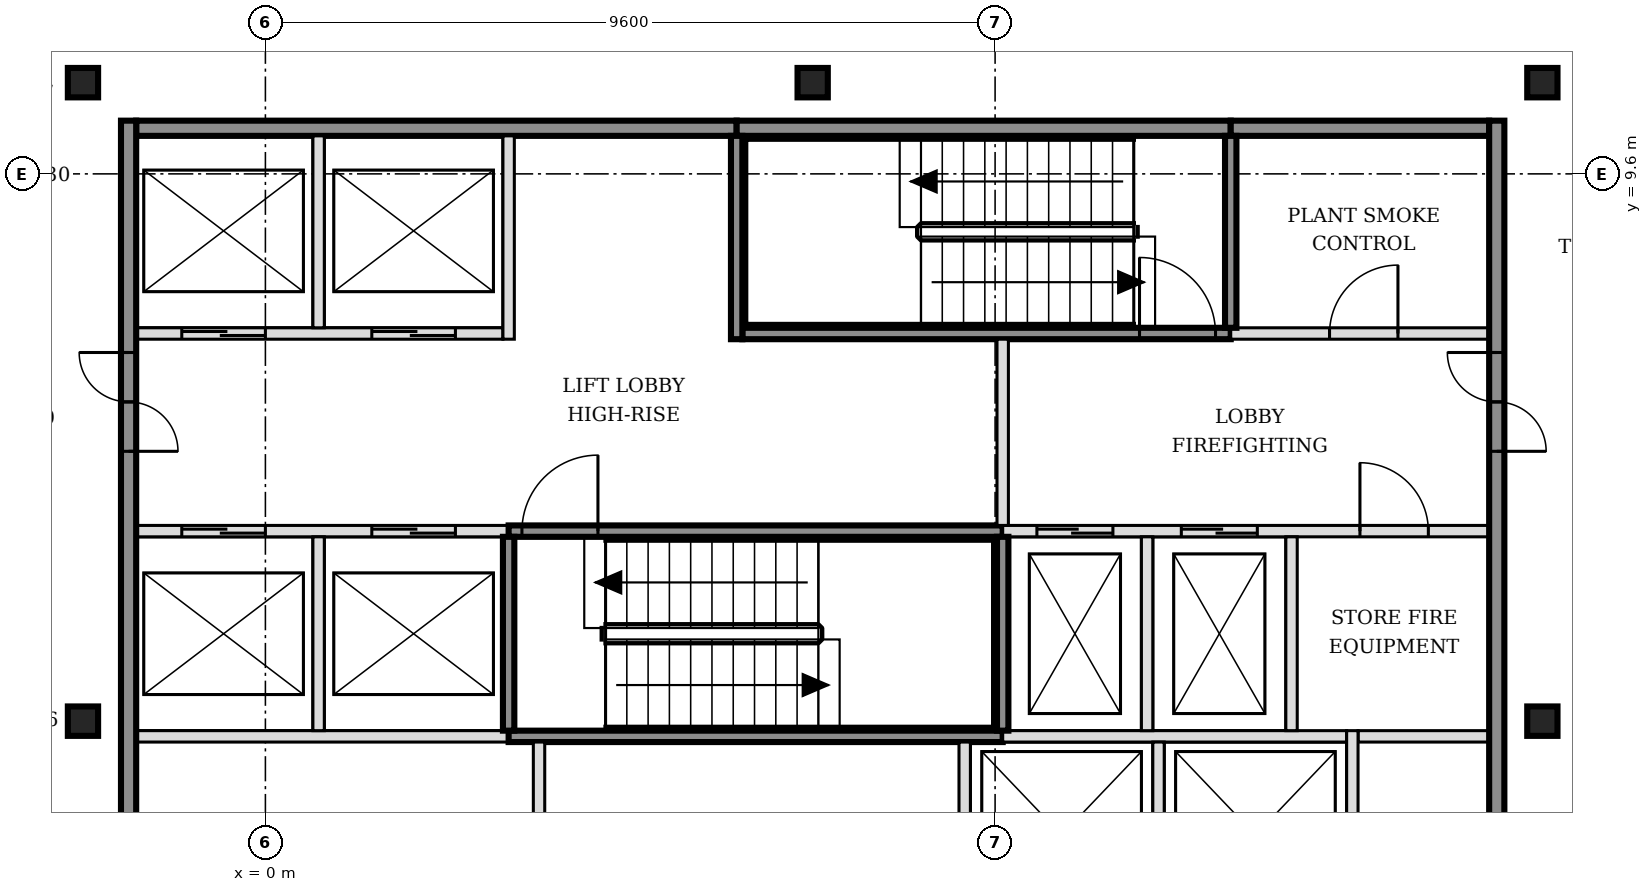
"""IFC4 building model, lengths in metres.
Left out: names, types, materials, properties, quantities, classifications, styles, units other than length and angle.
Written with IfcOpenShell. Run it as: python <this file> out.ifc"""

import sys

from ifc_helpers import new_model, si_unit, direction, frame, frame_2d, origin, origin_2d, place, context, subcontext, project, spatial, rectangle, i_section, extrude, element, fill, save


model = new_model("IFC4")
c1 = context("Model", 3, precision=1e-05, world=origin(), true_north=direction((0.0, 1.0)))
c2 = subcontext(c1, "Body", "Model", "MODEL_VIEW")
j1 = project(units=[si_unit("LENGTHUNIT", "METRE"), si_unit("PLANEANGLEUNIT", "RADIAN")], contexts=[c1])
p1 = place(None, origin())
s1 = spatial("IfcSite", under=j1, at=p1, CompositionType="ELEMENT")
p2 = place(p1, origin())
s2 = spatial("IfcBuilding", under=s1, at=p2, CompositionType="ELEMENT")
p3 = place(p2, frame((0.0, 0.0, 285.0)))
s3 = spatial("IfcBuildingStorey", under=s2, at=p3, CompositionType="ELEMENT", Elevation=285.0)
for number, where, z_axis, x_axis in (
    (1, (-2.4, 2.4, -0.15), (0.0, 0.0, 1.0), (1.0, 0.0, 0.0)),
    (2, (16.8, 2.4, -0.15), (0.0, 0.0, 1.0), (1.0, 0.0, 0.0)),
    (3, (-2.4, 10.8, -0.15), (0.0, 0.0, 1.0), (1.0, 0.0, 0.0)),
    (4, (7.2, 10.8, -0.15), (0.0, 0.0, 1.0), (1.0, 0.0, 0.0)),
    (5, (16.8, 10.8, -0.15), (0.0, 0.0, 1.0), (1.0, 0.0, 0.0)),
):
    element("IfcColumn", number, at=place(p3, frame(where, z_axis=z_axis, x_axis=x_axis)), inside=s3, PredefinedType="COLUMN", context=c2, shape_type="SweptSolid", body=[
        extrude(i_section(OverallWidth=0.398, OverallDepth=0.387, WebThickness=0.021, FlangeThickness=0.033, FilletRadius=0.015, at=origin_2d()), origin(), (0.0, 0.0, 1.0), 3.6),
    ])
p4 = place(p3, frame((-1.7, 2.2, 0.0), z_axis=(0.0, 0.0, 1.0), x_axis=(1.0, 0.0, 0.0)))
e6 = element("IfcWall", 6, at=p4, inside=s3, PredefinedType="SOLIDWALL", context=c2, shape_type="SweptSolid", body=[
    extrude(rectangle(XDim=4.9, YDim=0.15, at=frame_2d((2.45, 0.0))), origin(), (0.0, 0.0, 1.0), 3.45),
])
p5 = place(p3, frame((3.2, 2.2, 0.0), z_axis=(0.0, 0.0, 1.0), x_axis=(1.0, 0.0, 0.0)))
e7 = element("IfcWall", 7, at=p5, inside=s3, PredefinedType="SOLIDWALL", context=c2, shape_type="SweptSolid", body=[
    extrude(rectangle(XDim=6.5, YDim=0.15, at=frame_2d((3.25, 0.0))), origin(), (0.0, 0.0, 1.0), 3.45),
])
p6 = place(p3, frame((9.7, 2.2, 0.0), z_axis=(0.0, 0.0, 1.0), x_axis=(1.0, 0.0, 0.0)))
e8 = element("IfcWall", 8, at=p6, inside=s3, PredefinedType="SOLIDWALL", context=c2, shape_type="SweptSolid", body=[
    extrude(rectangle(XDim=4.525, YDim=0.15, at=frame_2d((2.263, 0.0))), origin(), (0.0, 0.0, 1.0), 3.45),
])
p7 = place(p3, frame((14.375, 2.2, 0.0), z_axis=(0.0, 0.0, 1.0), x_axis=(1.0, 0.0, 0.0)))
e9 = element("IfcWall", 9, at=p7, inside=s3, PredefinedType="PARTITIONING", context=c2, shape_type="SweptSolid", body=[
    extrude(rectangle(XDim=1.725, YDim=0.15, at=frame_2d((0.863, 0.0))), origin(), (0.0, 0.0, 1.0), 3.45),
])
p8 = place(p3, frame((-1.7, 4.9, 0.0), z_axis=(0.0, 0.0, 1.0), x_axis=(1.0, 0.0, 0.0)))
e10 = element("IfcWall", 10, at=p8, inside=s3, PredefinedType="SOLIDWALL", context=c2, shape_type="SweptSolid", body=[
    extrude(rectangle(XDim=4.9, YDim=0.15, at=frame_2d((2.45, 0.0))), origin(), (0.0, 0.0, 1.0), 3.45),
])
p9 = place(p8, frame((0.6, 0.0, 0.0)))
e11 = element("IfcOpeningElement", 11, at=p9, cuts=e10, PredefinedType="OPENING", context=c2, shape_type="SweptSolid", body=[
    extrude(rectangle(XDim=1.1, YDim=2.1, at=frame_2d((0.55, 1.05))), frame((0.0, 0.085, 0.0), z_axis=(0.0, -1.0, 0.0), x_axis=(1.0, 0.0, 0.0)), (0.0, 0.0, 1.0), 0.17),
])
p10 = place(p8, frame((3.1, 0.0, 0.0)))
e12 = element("IfcOpeningElement", 12, at=p10, cuts=e10, PredefinedType="OPENING", context=c2, shape_type="SweptSolid", body=[
    extrude(rectangle(XDim=1.1, YDim=2.1, at=frame_2d((0.55, 1.05))), frame((0.0, 0.085, 0.0), z_axis=(0.0, -1.0, 0.0), x_axis=(1.0, 0.0, 0.0)), (0.0, 0.0, 1.0), 0.17),
])
p11 = place(p3, frame((3.2, 4.9, 0.0), z_axis=(0.0, 0.0, 1.0), x_axis=(1.0, 0.0, 0.0)))
e13 = element("IfcWall", 13, at=p11, inside=s3, PredefinedType="SOLIDWALL", context=c2, shape_type="SweptSolid", body=[
    extrude(rectangle(XDim=6.5, YDim=0.15, at=frame_2d((3.25, 0.0))), origin(), (0.0, 0.0, 1.0), 3.45),
])
p12 = place(p11, frame((0.175, 0.0, 0.0)))
e14 = element("IfcOpeningElement", 14, at=p12, cuts=e13, PredefinedType="OPENING", context=c2, shape_type="SweptSolid", body=[
    extrude(rectangle(XDim=1.0, YDim=2.1, at=frame_2d((0.5, 1.05))), frame((0.0, 0.085, 0.0), z_axis=(0.0, -1.0, 0.0), x_axis=(1.0, 0.0, 0.0)), (0.0, 0.0, 1.0), 0.17),
])
p13 = place(p3, frame((9.7, 4.9, 0.0), z_axis=(0.0, 0.0, 1.0), x_axis=(1.0, 0.0, 0.0)))
e15 = element("IfcWall", 15, at=p13, inside=s3, PredefinedType="SOLIDWALL", context=c2, shape_type="SweptSolid", body=[
    extrude(rectangle(XDim=6.4, YDim=0.15, at=frame_2d((3.2, 0.0))), origin(), (0.0, 0.0, 1.0), 3.45),
])
p14 = place(p13, frame((0.45, 0.0, 0.0)))
e16 = element("IfcOpeningElement", 16, at=p14, cuts=e15, PredefinedType="OPENING", context=c2, shape_type="SweptSolid", body=[
    extrude(rectangle(XDim=1.0, YDim=2.1, at=frame_2d((0.5, 1.05))), frame((0.0, 0.085, 0.0), z_axis=(0.0, -1.0, 0.0), x_axis=(1.0, 0.0, 0.0)), (0.0, 0.0, 1.0), 0.17),
])
p15 = place(p13, frame((2.35, 0.0, 0.0)))
e17 = element("IfcOpeningElement", 17, at=p15, cuts=e15, PredefinedType="OPENING", context=c2, shape_type="SweptSolid", body=[
    extrude(rectangle(XDim=1.0, YDim=2.1, at=frame_2d((0.5, 1.05))), frame((0.0, 0.085, 0.0), z_axis=(0.0, -1.0, 0.0), x_axis=(1.0, 0.0, 0.0)), (0.0, 0.0, 1.0), 0.17),
])
p16 = place(p13, frame((4.7, 0.0, 0.0)))
e18 = element("IfcOpeningElement", 18, at=p16, cuts=e15, PredefinedType="OPENING", context=c2, shape_type="SweptSolid", body=[
    extrude(rectangle(XDim=0.9, YDim=2.1, at=frame_2d((0.45, 1.05))), frame((0.0, 0.085, 0.0), z_axis=(0.0, -1.0, 0.0), x_axis=(1.0, 0.0, 0.0)), (0.0, 0.0, 1.0), 0.17),
])
p17 = place(p3, frame((-1.7, 7.5, 0.0), z_axis=(0.0, 0.0, 1.0), x_axis=(1.0, 0.0, 0.0)))
e19 = element("IfcWall", 19, at=p17, inside=s3, PredefinedType="SOLIDWALL", context=c2, shape_type="SweptSolid", body=[
    extrude(rectangle(XDim=4.825, YDim=0.15, at=frame_2d((2.413, 0.0))), origin(), (0.0, 0.0, 1.0), 3.45),
])
p18 = place(p17, frame((0.6, 0.0, 0.0)))
e20 = element("IfcOpeningElement", 20, at=p18, cuts=e19, PredefinedType="OPENING", context=c2, shape_type="SweptSolid", body=[
    extrude(rectangle(XDim=1.1, YDim=2.1, at=frame_2d((0.55, 1.05))), frame((0.0, 0.085, 0.0), z_axis=(0.0, -1.0, 0.0), x_axis=(1.0, 0.0, 0.0)), (0.0, 0.0, 1.0), 0.17),
])
p19 = place(p17, frame((3.1, 0.0, 0.0)))
e21 = element("IfcOpeningElement", 21, at=p19, cuts=e19, PredefinedType="OPENING", context=c2, shape_type="SweptSolid", body=[
    extrude(rectangle(XDim=1.1, YDim=2.1, at=frame_2d((0.55, 1.05))), frame((0.0, 0.085, 0.0), z_axis=(0.0, -1.0, 0.0), x_axis=(1.0, 0.0, 0.0)), (0.0, 0.0, 1.0), 0.17),
])
p20 = place(p3, frame((6.275, 7.5, 0.0), z_axis=(0.0, 0.0, 1.0), x_axis=(1.0, 0.0, 0.0)))
e22 = element("IfcWall", 22, at=p20, inside=s3, PredefinedType="SOLIDWALL", context=c2, shape_type="SweptSolid", body=[
    extrude(rectangle(XDim=6.425, YDim=0.15, at=frame_2d((3.212, 0.0))), origin(), (0.0, 0.0, 1.0), 3.45),
])
p21 = place(p20, frame((5.225, 0.0, 0.0)))
e23 = element("IfcOpeningElement", 23, at=p21, cuts=e22, PredefinedType="OPENING", context=c2, shape_type="SweptSolid", body=[
    extrude(rectangle(XDim=1.0, YDim=2.1, at=frame_2d((0.5, 1.05))), frame((0.0, 0.085, 0.0), z_axis=(0.0, -1.0, 0.0), x_axis=(1.0, 0.0, 0.0)), (0.0, 0.0, 1.0), 0.17),
])
p22 = place(p3, frame((12.7, 7.5, 0.0), z_axis=(0.0, 0.0, 1.0), x_axis=(1.0, 0.0, 0.0)))
e24 = element("IfcWall", 24, at=p22, inside=s3, PredefinedType="SOLIDWALL", context=c2, shape_type="SweptSolid", body=[
    extrude(rectangle(XDim=3.4, YDim=0.15, at=frame_2d((1.7, 0.0))), origin(), (0.0, 0.0, 1.0), 3.45),
])
p23 = place(p22, frame((1.3, 0.0, 0.0)))
e25 = element("IfcOpeningElement", 25, at=p23, cuts=e24, PredefinedType="OPENING", context=c2, shape_type="SweptSolid", body=[
    extrude(rectangle(XDim=0.9, YDim=2.1, at=frame_2d((0.45, 1.05))), frame((0.0, 0.085, 0.0), z_axis=(0.0, -1.0, 0.0), x_axis=(1.0, 0.0, 0.0)), (0.0, 0.0, 1.0), 0.17),
])
p24 = place(p3, frame((-1.7, 10.2, 0.0), z_axis=(0.0, 0.0, 1.0), x_axis=(1.0, 0.0, 0.0)))
e26 = element("IfcWall", 26, at=p24, inside=s3, PredefinedType="SOLIDWALL", context=c2, shape_type="SweptSolid", body=[
    extrude(rectangle(XDim=7.9, YDim=0.2, at=frame_2d((3.95, 0.0))), origin(), (0.0, 0.0, 1.0), 3.45),
])
p25 = place(p3, frame((6.2, 10.2, 0.0), z_axis=(0.0, 0.0, 1.0), x_axis=(1.0, 0.0, 0.0)))
e27 = element("IfcWall", 27, at=p25, inside=s3, PredefinedType="SOLIDWALL", context=c2, shape_type="SweptSolid", body=[
    extrude(rectangle(XDim=6.5, YDim=0.2, at=frame_2d((3.25, 0.0))), origin(), (0.0, 0.0, 1.0), 3.45),
])
p26 = place(p3, frame((12.7, 10.2, 0.0), z_axis=(0.0, 0.0, 1.0), x_axis=(1.0, 0.0, 0.0)))
e28 = element("IfcWall", 28, at=p26, inside=s3, PredefinedType="SOLIDWALL", context=c2, shape_type="SweptSolid", body=[
    extrude(rectangle(XDim=3.4, YDim=0.2, at=frame_2d((1.7, 0.0))), origin(), (0.0, 0.0, 1.0), 3.45),
])
p27 = place(p3, frame((-1.8, -5.5, 0.0), z_axis=(0.0, 0.0, 1.0), x_axis=(0.0, 1.0, 0.0)))
e29 = element("IfcWall", 29, at=p27, inside=s3, PredefinedType="SOLIDWALL", context=c2, shape_type="SweptSolid", body=[
    extrude(rectangle(XDim=15.8, YDim=0.2, at=frame_2d((7.9, 0.0))), origin(), (0.0, 0.0, 1.0), 3.45),
])
p28 = place(p27, frame((3.05, 0.0, 0.0)))
e30 = element("IfcOpeningElement", 30, at=p28, cuts=e29, PredefinedType="OPENING", context=c2, shape_type="SweptSolid", body=[
    extrude(rectangle(XDim=1.3, YDim=2.1, at=frame_2d((0.65, 1.05))), frame((0.0, 0.11, 0.0), z_axis=(0.0, -1.0, 0.0), x_axis=(1.0, 0.0, 0.0)), (0.0, 0.0, 1.0), 0.22),
])
p29 = place(p27, frame((11.45, 0.0, 0.0)))
e31 = element("IfcOpeningElement", 31, at=p29, cuts=e29, PredefinedType="OPENING", context=c2, shape_type="SweptSolid", body=[
    extrude(rectangle(XDim=1.3, YDim=2.1, at=frame_2d((0.65, 1.05))), frame((0.0, 0.11, 0.0), z_axis=(0.0, -1.0, 0.0), x_axis=(1.0, 0.0, 0.0)), (0.0, 0.0, 1.0), 0.22),
])
p30 = place(p3, frame((0.7, 2.275, 0.0), z_axis=(0.0, 0.0, 1.0), x_axis=(0.0, 1.0, 0.0)))
e32 = element("IfcWall", 32, at=p30, inside=s3, PredefinedType="SOLIDWALL", context=c2, shape_type="SweptSolid", body=[
    extrude(rectangle(XDim=2.55, YDim=0.15, at=frame_2d((1.275, 0.0))), origin(), (0.0, 0.0, 1.0), 3.45),
])
p31 = place(p3, frame((0.7, 7.575, 0.0), z_axis=(0.0, 0.0, 1.0), x_axis=(0.0, 1.0, 0.0)))
e33 = element("IfcWall", 33, at=p31, inside=s3, PredefinedType="SOLIDWALL", context=c2, shape_type="SweptSolid", body=[
    extrude(rectangle(XDim=2.525, YDim=0.15, at=frame_2d((1.263, 0.0))), origin(), (0.0, 0.0, 1.0), 3.45),
])
p32 = place(p3, frame((3.2, 2.275, 0.0), z_axis=(0.0, 0.0, 1.0), x_axis=(0.0, 1.0, 0.0)))
e34 = element("IfcWall", 34, at=p32, inside=s3, PredefinedType="SOLIDWALL", context=c2, shape_type="SweptSolid", body=[
    extrude(rectangle(XDim=2.55, YDim=0.15, at=frame_2d((1.275, 0.0))), origin(), (0.0, 0.0, 1.0), 3.45),
])
p33 = place(p3, frame((3.2, 7.425, 0.0), z_axis=(0.0, 0.0, 1.0), x_axis=(0.0, 1.0, 0.0)))
e35 = element("IfcWall", 35, at=p33, inside=s3, PredefinedType="SOLIDWALL", context=c2, shape_type="SweptSolid", body=[
    extrude(rectangle(XDim=2.675, YDim=0.15, at=frame_2d((1.337, 0.0))), origin(), (0.0, 0.0, 1.0), 3.45),
])
p34 = place(p3, frame((3.6, -0.325, 0.0), z_axis=(0.0, 0.0, 1.0), x_axis=(0.0, 1.0, 0.0)))
e36 = element("IfcWall", 36, at=p34, inside=s3, PredefinedType="PARTITIONING", context=c2, shape_type="SweptSolid", body=[
    extrude(rectangle(XDim=2.45, YDim=0.15, at=frame_2d((1.225, 0.0))), origin(), (0.0, 0.0, 1.0), 3.45),
])
p35 = place(p3, frame((6.2, 7.425, 0.0), z_axis=(0.0, 0.0, 1.0), x_axis=(0.0, 1.0, 0.0)))
e37 = element("IfcWall", 37, at=p35, inside=s3, PredefinedType="SOLIDWALL", context=c2, shape_type="SweptSolid", body=[
    extrude(rectangle(XDim=2.675, YDim=0.15, at=frame_2d((1.337, 0.0))), origin(), (0.0, 0.0, 1.0), 3.45),
])
p36 = place(p3, frame((9.2, -0.475, 0.0), z_axis=(0.0, 0.0, 1.0), x_axis=(0.0, 1.0, 0.0)))
e38 = element("IfcWall", 38, at=p36, inside=s3, PredefinedType="SOLIDWALL", context=c2, shape_type="SweptSolid", body=[
    extrude(rectangle(XDim=2.6, YDim=0.15, at=frame_2d((1.3, 0.0))), origin(), (0.0, 0.0, 1.0), 3.45),
])
p37 = place(p3, frame((9.7, 2.275, 0.0), z_axis=(0.0, 0.0, 1.0), x_axis=(0.0, 1.0, 0.0)))
e39 = element("IfcWall", 39, at=p37, inside=s3, PredefinedType="SOLIDWALL", context=c2, shape_type="SweptSolid", body=[
    extrude(rectangle(XDim=2.55, YDim=0.15, at=frame_2d((1.275, 0.0))), origin(), (0.0, 0.0, 1.0), 3.45),
])
p38 = place(p3, frame((9.7, 4.975, 0.0), z_axis=(0.0, 0.0, 1.0), x_axis=(0.0, 1.0, 0.0)))
e40 = element("IfcWall", 40, at=p38, inside=s3, PredefinedType="SOLIDWALL", context=c2, shape_type="SweptSolid", body=[
    extrude(rectangle(XDim=2.45, YDim=0.15, at=frame_2d((1.225, 0.0))), origin(), (0.0, 0.0, 1.0), 3.45),
])
p39 = place(p3, frame((11.6, 2.275, 0.0), z_axis=(0.0, 0.0, 1.0), x_axis=(0.0, 1.0, 0.0)))
e41 = element("IfcWall", 41, at=p39, inside=s3, PredefinedType="SOLIDWALL", context=c2, shape_type="SweptSolid", body=[
    extrude(rectangle(XDim=2.55, YDim=0.15, at=frame_2d((1.275, 0.0))), origin(), (0.0, 0.0, 1.0), 3.45),
])
p40 = place(p3, frame((11.75, -0.325, 0.0), z_axis=(0.0, 0.0, 1.0), x_axis=(0.0, 1.0, 0.0)))
e42 = element("IfcWall", 42, at=p40, inside=s3, PredefinedType="SOLIDWALL", context=c2, shape_type="SweptSolid", body=[
    extrude(rectangle(XDim=2.45, YDim=0.15, at=frame_2d((1.225, 0.0))), origin(), (0.0, 0.0, 1.0), 3.45),
])
p41 = place(p3, frame((12.7, 7.575, 0.0), z_axis=(0.0, 0.0, 1.0), x_axis=(0.0, 1.0, 0.0)))
e43 = element("IfcWall", 43, at=p41, inside=s3, PredefinedType="SOLIDWALL", context=c2, shape_type="SweptSolid", body=[
    extrude(rectangle(XDim=2.525, YDim=0.15, at=frame_2d((1.263, 0.0))), origin(), (0.0, 0.0, 1.0), 3.45),
])
p42 = place(p3, frame((13.5, 2.275, 0.0), z_axis=(0.0, 0.0, 1.0), x_axis=(0.0, 1.0, 0.0)))
e44 = element("IfcWall", 44, at=p42, inside=s3, PredefinedType="SOLIDWALL", context=c2, shape_type="SweptSolid", body=[
    extrude(rectangle(XDim=2.55, YDim=0.15, at=frame_2d((1.275, 0.0))), origin(), (0.0, 0.0, 1.0), 3.45),
])
p43 = place(p3, frame((14.3, -0.475, 0.0), z_axis=(0.0, 0.0, 1.0), x_axis=(0.0, 1.0, 0.0)))
e45 = element("IfcWall", 45, at=p43, inside=s3, PredefinedType="SOLIDWALL", context=c2, shape_type="SweptSolid", body=[
    extrude(rectangle(XDim=2.75, YDim=0.15, at=frame_2d((1.375, 0.0))), origin(), (0.0, 0.0, 1.0), 3.45),
])
p44 = place(p3, frame((16.2, -5.5, 0.0), z_axis=(0.0, 0.0, 1.0), x_axis=(0.0, 1.0, 0.0)))
e46 = element("IfcWall", 46, at=p44, inside=s3, PredefinedType="SOLIDWALL", context=c2, shape_type="SweptSolid", body=[
    extrude(rectangle(XDim=15.8, YDim=0.2, at=frame_2d((7.9, 0.0))), origin(), (0.0, 0.0, 1.0), 3.45),
])
p45 = place(p44, frame((3.05, 0.0, 0.0)))
e47 = element("IfcOpeningElement", 47, at=p45, cuts=e46, PredefinedType="OPENING", context=c2, shape_type="SweptSolid", body=[
    extrude(rectangle(XDim=1.3, YDim=2.1, at=frame_2d((0.65, 1.05))), frame((0.0, 0.11, 0.0), z_axis=(0.0, -1.0, 0.0), x_axis=(1.0, 0.0, 0.0)), (0.0, 0.0, 1.0), 0.22),
])
p46 = place(p44, frame((11.45, 0.0, 0.0)))
e48 = element("IfcOpeningElement", 48, at=p46, cuts=e46, PredefinedType="OPENING", context=c2, shape_type="SweptSolid", body=[
    extrude(rectangle(XDim=1.3, YDim=2.1, at=frame_2d((0.65, 1.05))), frame((0.0, 0.11, 0.0), z_axis=(0.0, -1.0, 0.0), x_axis=(1.0, 0.0, 0.0)), (0.0, 0.0, 1.0), 0.22),
])
p47 = place(p9, origin())
e49 = element("IfcDoor", 49, at=p47, inside=s3, OperationType="DOUBLE_DOOR_SLIDING", PredefinedType="DOOR", context=c2, shape_type="SweptSolid", body=[
    extrude(rectangle(XDim=1.1, YDim=2.1, at=frame_2d((0.55, 1.05))), frame((0.0, 0.025, 0.0), z_axis=(0.0, -1.0, 0.0), x_axis=(1.0, 0.0, 0.0)), (0.0, 0.0, 1.0), 0.05),
])
fill(e11, e49)
p48 = place(p10, origin())
e50 = element("IfcDoor", 50, at=p48, inside=s3, OperationType="DOUBLE_DOOR_SLIDING", PredefinedType="DOOR", context=c2, shape_type="SweptSolid", body=[
    extrude(rectangle(XDim=1.1, YDim=2.1, at=frame_2d((0.55, 1.05))), frame((0.0, 0.025, 0.0), z_axis=(0.0, -1.0, 0.0), x_axis=(1.0, 0.0, 0.0)), (0.0, 0.0, 1.0), 0.05),
])
fill(e12, e50)
p49 = place(p18, origin())
e51 = element("IfcDoor", 51, at=p49, inside=s3, OperationType="DOUBLE_DOOR_SLIDING", PredefinedType="DOOR", context=c2, shape_type="SweptSolid", body=[
    extrude(rectangle(XDim=1.1, YDim=2.1, at=frame_2d((0.55, 1.05))), frame((0.0, 0.025, 0.0), z_axis=(0.0, -1.0, 0.0), x_axis=(1.0, 0.0, 0.0)), (0.0, 0.0, 1.0), 0.05),
])
fill(e20, e51)
p50 = place(p19, origin())
e52 = element("IfcDoor", 52, at=p50, inside=s3, OperationType="DOUBLE_DOOR_SLIDING", PredefinedType="DOOR", context=c2, shape_type="SweptSolid", body=[
    extrude(rectangle(XDim=1.1, YDim=2.1, at=frame_2d((0.55, 1.05))), frame((0.0, 0.025, 0.0), z_axis=(0.0, -1.0, 0.0), x_axis=(1.0, 0.0, 0.0)), (0.0, 0.0, 1.0), 0.05),
])
fill(e21, e52)
p51 = place(p14, origin())
e53 = element("IfcDoor", 53, at=p51, inside=s3, OperationType="DOUBLE_DOOR_SLIDING", PredefinedType="DOOR", context=c2, shape_type="SweptSolid", body=[
    extrude(rectangle(XDim=1.0, YDim=2.1, at=frame_2d((0.5, 1.05))), frame((0.0, 0.025, 0.0), z_axis=(0.0, -1.0, 0.0), x_axis=(1.0, 0.0, 0.0)), (0.0, 0.0, 1.0), 0.05),
])
fill(e16, e53)
p52 = place(p15, origin())
e54 = element("IfcDoor", 54, at=p52, inside=s3, OperationType="DOUBLE_DOOR_SLIDING", PredefinedType="DOOR", context=c2, shape_type="SweptSolid", body=[
    extrude(rectangle(XDim=1.0, YDim=2.1, at=frame_2d((0.5, 1.05))), frame((0.0, 0.025, 0.0), z_axis=(0.0, -1.0, 0.0), x_axis=(1.0, 0.0, 0.0)), (0.0, 0.0, 1.0), 0.05),
])
fill(e17, e54)
p53 = place(p12, origin())
e55 = element("IfcDoor", 55, at=p53, inside=s3, OperationType="SINGLE_SWING_RIGHT", PredefinedType="DOOR", context=c2, shape_type="SweptSolid", body=[
    extrude(rectangle(XDim=1.0, YDim=2.1, at=frame_2d((0.5, 1.05))), frame((0.0, 0.025, 0.0), z_axis=(0.0, -1.0, 0.0), x_axis=(1.0, 0.0, 0.0)), (0.0, 0.0, 1.0), 0.05),
])
fill(e14, e55)
p54 = place(p21, origin())
e56 = element("IfcDoor", 56, at=p54, inside=s3, OperationType="SINGLE_SWING_LEFT", PredefinedType="DOOR", context=c2, shape_type="SweptSolid", body=[
    extrude(rectangle(XDim=1.0, YDim=2.1, at=frame_2d((0.5, 1.05))), frame((0.0, 0.025, 0.0), z_axis=(0.0, -1.0, 0.0), x_axis=(1.0, 0.0, 0.0)), (0.0, 0.0, 1.0), 0.05),
])
fill(e23, e56)
p55 = place(p29, origin())
e57 = element("IfcDoor", 57, at=p55, inside=s3, OperationType="DOUBLE_DOOR_SINGLE_SWING", PredefinedType="DOOR", context=c2, shape_type="SweptSolid", body=[
    extrude(rectangle(XDim=1.3, YDim=2.1, at=frame_2d((0.65, 1.05))), frame((0.0, 0.025, 0.0), z_axis=(0.0, -1.0, 0.0), x_axis=(1.0, 0.0, 0.0)), (0.0, 0.0, 1.0), 0.05),
])
fill(e31, e57)
p56 = place(p46, origin())
e58 = element("IfcDoor", 58, at=p56, inside=s3, OperationType="DOUBLE_DOOR_SINGLE_SWING", PredefinedType="DOOR", context=c2, shape_type="SweptSolid", body=[
    extrude(rectangle(XDim=1.3, YDim=2.1, at=frame_2d((0.65, 1.05))), frame((0.0, 0.025, 0.0), z_axis=(0.0, -1.0, 0.0), x_axis=(1.0, 0.0, 0.0)), (0.0, 0.0, 1.0), 0.05),
])
fill(e48, e58)
p57 = place(p16, origin())
e59 = element("IfcDoor", 59, at=p57, inside=s3, OperationType="SINGLE_SWING_LEFT", PredefinedType="DOOR", context=c2, shape_type="SweptSolid", body=[
    extrude(rectangle(XDim=0.9, YDim=2.1, at=frame_2d((0.45, 1.05))), frame((0.0, 0.025, 0.0), z_axis=(0.0, -1.0, 0.0), x_axis=(1.0, 0.0, 0.0)), (0.0, 0.0, 1.0), 0.05),
])
fill(e18, e59)
p58 = place(p23, origin())
e60 = element("IfcDoor", 60, at=p58, inside=s3, OperationType="SINGLE_SWING_RIGHT", PredefinedType="DOOR", context=c2, shape_type="SweptSolid", body=[
    extrude(rectangle(XDim=0.9, YDim=2.1, at=frame_2d((0.45, 1.05))), frame((0.0, 0.025, 0.0), z_axis=(0.0, -1.0, 0.0), x_axis=(1.0, 0.0, 0.0)), (0.0, 0.0, 1.0), 0.05),
])
fill(e25, e60)
save(model, sys.argv[1])
